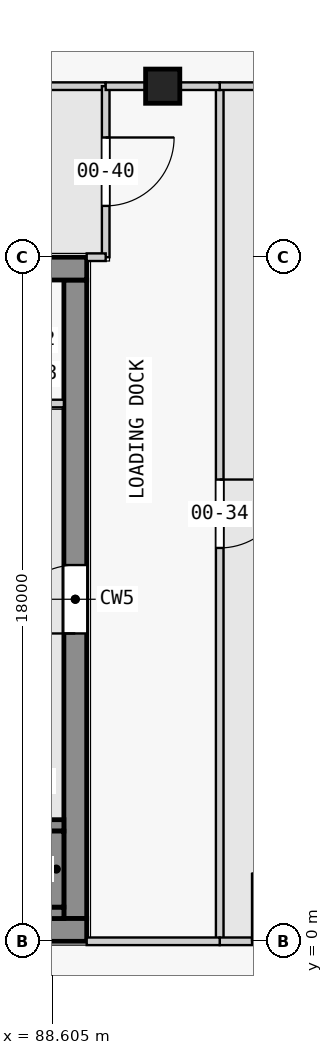
"""IFC4 building model, lengths in metres.
Left out: names, types, materials, properties, quantities, classifications, styles, units other than length and angle.
Written with IfcOpenShell. Run it as: python <this file> out.ifc"""

import sys

from ifc_helpers import new_model, si_unit, direction, frame, frame_2d, origin, origin_2d, place, context, subcontext, project, spatial, rectangle, extrude, element, fill, save


model = new_model("IFC4")
c1 = context("Model", 3, precision=1e-05, world=origin(), true_north=direction((0.0, 1.0)))
c2 = subcontext(c1, "Body", "Model", "MODEL_VIEW")
j1 = project(units=[si_unit("LENGTHUNIT", "METRE"), si_unit("PLANEANGLEUNIT", "RADIAN")], contexts=[c1])
p1 = place(None, origin())
s1 = spatial("IfcSite", under=j1, at=p1, CompositionType="ELEMENT")
p2 = place(p1, origin())
s2 = spatial("IfcBuilding", under=s1, at=p2, CompositionType="ELEMENT")
p3 = place(p2, origin())
s3 = spatial("IfcBuildingStorey", under=s2, at=p3, CompositionType="ELEMENT", Elevation=0.0)
p4 = place(p3, frame((91.5, 22.5, 0.0), z_axis=(0.0, 0.0, 1.0), x_axis=(1.0, 0.0, 0.0)))
e1 = element("IfcColumn", 1, at=p4, inside=s3, PredefinedType="COLUMN", context=c2, shape_type="SweptSolid", body=[
    extrude(rectangle(XDim=0.9, YDim=0.9, at=origin_2d()), origin(), (0.0, 0.0, 1.0), 8.0),
])
p5 = place(p3, frame((75.0, 0.3, 0.0), z_axis=(0.0, 0.0, 1.0), x_axis=(1.0, 0.0, 0.0)))
e2 = element("IfcWall", 2, at=p5, inside=s3, PredefinedType="SHEAR", context=c2, shape_type="SweptSolid", body=[
    extrude(rectangle(XDim=14.5, YDim=0.6, at=frame_2d((7.25, 0.0))), origin(), (0.0, 0.0, 1.0), 7.65),
])
p6 = place(p5, frame((0.85, 0.0, 0.0)))
e3 = element("IfcOpeningElement", 3, at=p6, cuts=e2, PredefinedType="OPENING", context=c2, shape_type="SweptSolid", body=[
    extrude(rectangle(XDim=1.1, YDim=2.1, at=frame_2d((0.55, 1.05))), frame((0.0, 0.31, 0.0), z_axis=(0.0, -1.0, 0.0), x_axis=(1.0, 0.0, 0.0)), (0.0, 0.0, 1.0), 0.62),
])
p7 = place(p5, frame((3.35, 0.0, 0.0)))
e4 = element("IfcOpeningElement", 4, at=p7, cuts=e2, PredefinedType="OPENING", context=c2, shape_type="SweptSolid", body=[
    extrude(rectangle(XDim=1.1, YDim=2.1, at=frame_2d((0.55, 1.05))), frame((0.0, 0.31, 0.0), z_axis=(0.0, -1.0, 0.0), x_axis=(1.0, 0.0, 0.0)), (0.0, 0.0, 1.0), 0.62),
])
p8 = place(p3, frame((75.0, 17.7, 0.0), z_axis=(0.0, 0.0, 1.0), x_axis=(1.0, 0.0, 0.0)))
e5 = element("IfcWall", 5, at=p8, inside=s3, PredefinedType="SHEAR", context=c2, shape_type="SweptSolid", body=[
    extrude(rectangle(XDim=14.5, YDim=0.6, at=frame_2d((7.25, 0.0))), origin(), (0.0, 0.0, 1.0), 7.65),
])
p9 = place(p3, frame((89.2, 0.6, 0.0), z_axis=(0.0, 0.0, 1.0), x_axis=(0.0, 1.0, 0.0)))
e6 = element("IfcWall", 6, at=p9, inside=s3, PredefinedType="SHEAR", context=c2, shape_type="SweptSolid", body=[
    extrude(rectangle(XDim=16.8, YDim=0.6, at=frame_2d((8.4, 0.0))), origin(), (0.0, 0.0, 1.0), 7.65),
])
p10 = place(p9, frame((7.5, 0.0, 0.0)))
e7 = element("IfcOpeningElement", 7, at=p10, cuts=e6, PredefinedType="OPENING", context=c2, shape_type="SweptSolid", body=[
    extrude(rectangle(XDim=1.8, YDim=2.1, at=frame_2d((0.9, 1.05))), frame((0.0, 0.31, 0.0), z_axis=(0.0, -1.0, 0.0), x_axis=(1.0, 0.0, 0.0)), (0.0, 0.0, 1.0), 0.62),
])
p11 = place(p3, frame((81.3, 0.75, 0.0), z_axis=(0.0, 0.0, 1.0), x_axis=(1.0, 0.0, 0.0)))
e8 = element("IfcWall", 8, at=p11, inside=s3, PredefinedType="SHEAR", context=c2, shape_type="SweptSolid", body=[
    extrude(rectangle(XDim=7.6, YDim=0.3, at=frame_2d((3.8, 0.0))), origin(), (0.0, 0.0, 1.0), 7.65),
])
p12 = place(p3, frame((88.7, 0.9, 0.0), z_axis=(0.0, 0.0, 1.0), x_axis=(0.0, 1.0, 0.0)))
e9 = element("IfcWall", 9, at=p12, inside=s3, PredefinedType="SHEAR", context=c2, shape_type="SweptSolid", body=[
    extrude(rectangle(XDim=2.0, YDim=0.4, at=frame_2d((1.0, 0.0))), origin(), (0.0, 0.0, 1.0), 7.65),
])
p13 = place(p3, frame((81.3, 3.05, 0.0), z_axis=(0.0, 0.0, 1.0), x_axis=(1.0, 0.0, 0.0)))
e10 = element("IfcWall", 10, at=p13, inside=s3, PredefinedType="SHEAR", context=c2, shape_type="SweptSolid", body=[
    extrude(rectangle(XDim=7.6, YDim=0.3, at=frame_2d((3.8, 0.0))), origin(), (0.0, 0.0, 1.0), 7.65),
])
p14 = place(p13, frame((0.55, 0.0, 0.0)))
e11 = element("IfcOpeningElement", 11, at=p14, cuts=e10, PredefinedType="OPENING", context=c2, shape_type="SweptSolid", body=[
    extrude(rectangle(XDim=1.1, YDim=2.1, at=frame_2d((0.55, 1.05))), frame((0.0, 0.16, 0.0), z_axis=(0.0, -1.0, 0.0), x_axis=(1.0, 0.0, 0.0)), (0.0, 0.0, 1.0), 0.32),
])
p15 = place(p13, frame((3.05, 0.0, 0.0)))
e12 = element("IfcOpeningElement", 12, at=p15, cuts=e10, PredefinedType="OPENING", context=c2, shape_type="SweptSolid", body=[
    extrude(rectangle(XDim=1.1, YDim=2.1, at=frame_2d((0.55, 1.05))), frame((0.0, 0.16, 0.0), z_axis=(0.0, -1.0, 0.0), x_axis=(1.0, 0.0, 0.0)), (0.0, 0.0, 1.0), 0.32),
])
p16 = place(p13, frame((5.55, 0.0, 0.0)))
e13 = element("IfcOpeningElement", 13, at=p16, cuts=e10, PredefinedType="OPENING", context=c2, shape_type="SweptSolid", body=[
    extrude(rectangle(XDim=1.1, YDim=2.1, at=frame_2d((0.55, 1.05))), frame((0.0, 0.16, 0.0), z_axis=(0.0, -1.0, 0.0), x_axis=(1.0, 0.0, 0.0)), (0.0, 0.0, 1.0), 0.32),
])
p17 = place(p3, frame((85.5, 14.15, 0.0), z_axis=(0.0, 0.0, 1.0), x_axis=(1.0, 0.0, 0.0)))
e14 = element("IfcWall", 14, at=p17, inside=s3, PredefinedType="PARTITIONING", context=c2, shape_type="SweptSolid", body=[
    extrude(rectangle(XDim=3.4, YDim=0.2, at=frame_2d((1.7, 0.0))), origin(), (0.0, 0.0, 1.0), 7.65),
])
p18 = place(p17, frame((0.4, 0.0, 0.0)))
e15 = element("IfcOpeningElement", 15, at=p18, cuts=e14, PredefinedType="OPENING", context=c2, shape_type="SweptSolid", body=[
    extrude(rectangle(XDim=0.9, YDim=2.1, at=frame_2d((0.45, 1.05))), frame((0.0, 0.11, 0.0), z_axis=(0.0, -1.0, 0.0), x_axis=(1.0, 0.0, 0.0)), (0.0, 0.0, 1.0), 0.22),
])
p19 = place(p17, frame((1.95, 0.0, 0.0)))
e16 = element("IfcOpeningElement", 16, at=p19, cuts=e14, PredefinedType="OPENING", context=c2, shape_type="SweptSolid", body=[
    extrude(rectangle(XDim=0.9, YDim=2.1, at=frame_2d((0.45, 1.05))), frame((0.0, 0.11, 0.0), z_axis=(0.0, -1.0, 0.0), x_axis=(1.0, 0.0, 0.0)), (0.0, 0.0, 1.0), 0.22),
])
p20 = place(p3, frame((93.0, 22.5, 0.0), z_axis=(0.0, 0.0, 1.0), x_axis=(0.0, -1.0, 0.0)))
e17 = element("IfcWall", 17, at=p20, inside=s3, PredefinedType="PARTITIONING", context=c2, shape_type="SweptSolid", body=[
    extrude(rectangle(XDim=22.5, YDim=0.2, at=frame_2d((11.25, 0.0))), origin(), (0.0, 0.0, 1.0), 7.65),
])
p21 = place(p20, frame((10.35, 0.0, 0.0)))
e18 = element("IfcOpeningElement", 18, at=p21, cuts=e17, PredefinedType="OPENING", context=c2, shape_type="SweptSolid", body=[
    extrude(rectangle(XDim=1.8, YDim=2.1, at=frame_2d((0.9, 1.05))), frame((0.0, 0.11, 0.0), z_axis=(0.0, -1.0, 0.0), x_axis=(1.0, 0.0, 0.0)), (0.0, 0.0, 1.0), 0.22),
])
p22 = place(p3, frame((90.0, 22.5, 0.0), z_axis=(0.0, 0.0, 1.0), x_axis=(-1.0, 0.0, 0.0)))
e19 = element("IfcWall", 19, at=p22, inside=s3, PredefinedType="PARTITIONING", context=c2, shape_type="SweptSolid", body=[
    extrude(rectangle(XDim=7.05, YDim=0.2, at=frame_2d((3.525, 0.0))), origin(), (0.0, 0.0, 1.0), 7.65),
])
p23 = place(p22, frame((2.6, 0.0, 0.0)))
e20 = element("IfcOpeningElement", 20, at=p23, cuts=e19, PredefinedType="OPENING", context=c2, shape_type="SweptSolid", body=[
    extrude(rectangle(XDim=1.8, YDim=2.1, at=frame_2d((0.9, 1.05))), frame((0.0, 0.11, 0.0), z_axis=(0.0, -1.0, 0.0), x_axis=(1.0, 0.0, 0.0)), (0.0, 0.0, 1.0), 0.22),
])
p24 = place(p3, frame((90.0, 22.5, 0.0), z_axis=(0.0, 0.0, 1.0), x_axis=(0.0, -1.0, 0.0)))
e21 = element("IfcWall", 21, at=p24, inside=s3, PredefinedType="PARTITIONING", context=c2, shape_type="SweptSolid", body=[
    extrude(rectangle(XDim=4.5, YDim=0.2, at=frame_2d((2.25, 0.0))), origin(), (0.0, 0.0, 1.0), 7.65),
])
p25 = place(p24, frame((1.35, 0.0, 0.0)))
e22 = element("IfcOpeningElement", 22, at=p25, cuts=e21, PredefinedType="OPENING", context=c2, shape_type="SweptSolid", body=[
    extrude(rectangle(XDim=1.8, YDim=2.1, at=frame_2d((0.9, 1.05))), frame((0.0, 0.11, 0.0), z_axis=(0.0, -1.0, 0.0), x_axis=(1.0, 0.0, 0.0)), (0.0, 0.0, 1.0), 0.22),
])
p26 = place(p3, frame((90.0, 18.0, 0.0), z_axis=(0.0, 0.0, 1.0), x_axis=(-1.0, 0.0, 0.0)))
e23 = element("IfcWall", 23, at=p26, inside=s3, PredefinedType="PARTITIONING", context=c2, shape_type="SweptSolid", body=[
    extrude(rectangle(XDim=0.5, YDim=0.2, at=frame_2d((0.25, 0.0))), origin(), (0.0, 0.0, 1.0), 7.65),
])
p27 = place(p3, frame((96.5, 22.5, 0.0), z_axis=(0.0, 0.0, 1.0), x_axis=(-1.0, 0.0, 0.0)))
e24 = element("IfcWall", 24, at=p27, inside=s3, PredefinedType="PARTITIONING", context=c2, shape_type="SweptSolid", body=[
    extrude(rectangle(XDim=3.5, YDim=0.2, at=frame_2d((1.75, 0.0))), origin(), (0.0, 0.0, 1.0), 7.65),
])
p28 = place(p3, frame((93.0, 0.0, 0.0), z_axis=(0.0, 0.0, 1.0), x_axis=(1.0, 0.0, 0.0)))
e25 = element("IfcWall", 25, at=p28, inside=s3, PredefinedType="PARTITIONING", context=c2, shape_type="SweptSolid", body=[
    extrude(rectangle(XDim=3.5, YDim=0.2, at=frame_2d((1.75, 0.0))), origin(), (0.0, 0.0, 1.0), 7.65),
])
p29 = place(p28, frame((0.85, 0.0, 0.0)))
e26 = element("IfcOpeningElement", 26, at=p29, cuts=e25, PredefinedType="OPENING", context=c2, shape_type="SweptSolid", body=[
    extrude(rectangle(XDim=1.8, YDim=2.1, at=frame_2d((0.9, 1.05))), frame((0.0, 0.11, 0.0), z_axis=(0.0, -1.0, 0.0), x_axis=(1.0, 0.0, 0.0)), (0.0, 0.0, 1.0), 0.22),
])
p30 = place(p3, frame((89.5, 0.0, 0.0), z_axis=(0.0, 0.0, 1.0), x_axis=(1.0, 0.0, 0.0)))
e27 = element("IfcWall", 27, at=p30, inside=s3, PredefinedType="PARTITIONING", context=c2, shape_type="SweptSolid", body=[
    extrude(rectangle(XDim=3.5, YDim=0.2, at=frame_2d((1.75, 0.0))), origin(), (0.0, 0.0, 1.0), 7.65),
])
for number, where, z_axis, x_axis in (
    (28, (93.0, 22.5, 0.0), (0.0, 0.0, 1.0), (-1.0, 0.0, 0.0)),
    (29, (91.05, 22.5, 0.0), (0.0, 0.0, 1.0), (-1.0, 0.0, 0.0)),
):
    element("IfcWall", number, at=place(p3, frame(where, z_axis=z_axis, x_axis=x_axis)), inside=s3, PredefinedType="PARTITIONING", context=c2, shape_type="SweptSolid", body=[
        extrude(rectangle(XDim=1.05, YDim=0.2, at=frame_2d((0.525, 0.0))), origin(), (0.0, 0.0, 1.0), 7.65),
    ])
p31 = place(p10, origin())
e30 = element("IfcDoor", 30, at=p31, inside=s3, OperationType="DOUBLE_DOOR_SINGLE_SWING", PredefinedType="DOOR", context=c2, shape_type="SweptSolid", body=[
    extrude(rectangle(XDim=1.8, YDim=2.1, at=frame_2d((0.9, 1.05))), frame((0.0, 0.025, 0.0), z_axis=(0.0, -1.0, 0.0), x_axis=(1.0, 0.0, 0.0)), (0.0, 0.0, 1.0), 0.05),
])
fill(e7, e30)
p32 = place(p21, origin())
e31 = element("IfcDoor", 31, at=p32, inside=s3, OperationType="DOUBLE_DOOR_SINGLE_SWING", PredefinedType="DOOR", context=c2, shape_type="SweptSolid", body=[
    extrude(rectangle(XDim=1.8, YDim=2.1, at=frame_2d((0.9, 1.05))), frame((0.0, 0.025, 0.0), z_axis=(0.0, -1.0, 0.0), x_axis=(1.0, 0.0, 0.0)), (0.0, 0.0, 1.0), 0.05),
])
fill(e18, e31)
p33 = place(p25, origin())
e32 = element("IfcDoor", 32, at=p33, inside=s3, OperationType="DOUBLE_DOOR_SINGLE_SWING", PredefinedType="DOOR", context=c2, shape_type="SweptSolid", body=[
    extrude(rectangle(XDim=1.8, YDim=2.1, at=frame_2d((0.9, 1.05))), frame((0.0, 0.025, 0.0), z_axis=(0.0, -1.0, 0.0), x_axis=(1.0, 0.0, 0.0)), (0.0, 0.0, 1.0), 0.05),
])
fill(e22, e32)
p34 = place(p29, origin())
e33 = element("IfcDoor", 33, at=p34, inside=s3, OperationType="DOUBLE_DOOR_SINGLE_SWING", PredefinedType="DOOR", context=c2, shape_type="SweptSolid", body=[
    extrude(rectangle(XDim=1.8, YDim=2.1, at=frame_2d((0.9, 1.05))), frame((0.0, 0.025, 0.0), z_axis=(0.0, -1.0, 0.0), x_axis=(1.0, 0.0, 0.0)), (0.0, 0.0, 1.0), 0.05),
])
fill(e26, e33)
save(model, sys.argv[1])
